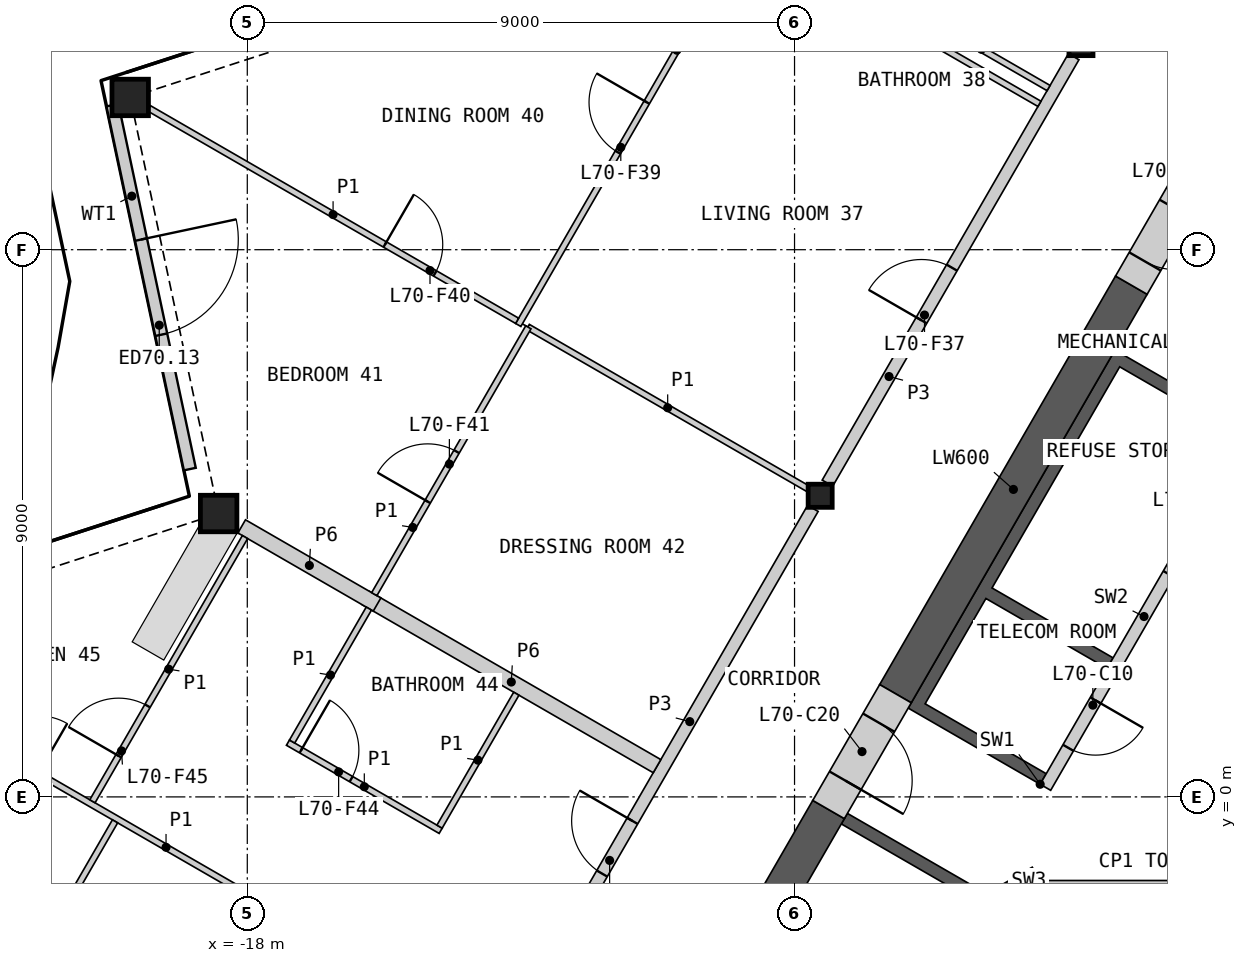
"""IFC4 building model, lengths in metres.
Left out: names, types, materials, properties, quantities, classifications, styles, units other than length and angle.
Written with IfcOpenShell. Run it as: python <this file> out.ifc"""

import sys

from ifc_helpers import new_model, si_unit, direction, frame, frame_2d, origin, origin_2d, place, context, subcontext, project, spatial, polyline, rectangle, hollow_rectangle, i_section, outline, extrude, element, fill, save


model = new_model("IFC4")
c1 = context("Model", 3, precision=1e-05, world=origin(), true_north=direction((0.0, 1.0)))
c2 = subcontext(c1, "Body", "Model", "MODEL_VIEW")
j1 = project(units=[si_unit("LENGTHUNIT", "METRE"), si_unit("PLANEANGLEUNIT", "RADIAN")], contexts=[c1])
p1 = place(None, origin())
s1 = spatial("IfcSite", under=j1, at=p1, CompositionType="ELEMENT")
p2 = place(p1, origin())
s2 = spatial("IfcBuilding", under=s1, at=p2, CompositionType="ELEMENT")
p3 = place(p2, frame((0.0, 0.0, 318.8)))
s3 = spatial("IfcBuildingStorey", under=s2, at=p3, CompositionType="ELEMENT", Elevation=318.8)
for number, where, z_axis, x_axis in (
    (1, (-19.926, 11.504, 0.0), (0.0, 0.0, 1.0), (1.0, 0.0, 0.0)),
    (2, (-18.471, 4.661, 0.0), (0.0, 0.0, 1.0), (1.0, 0.0, 0.0)),
):
    element("IfcColumn", number, at=place(p3, frame(where, z_axis=z_axis, x_axis=x_axis)), inside=s3, PredefinedType="COLUMN", context=c2, shape_type="SweptSolid", body=[
        extrude(hollow_rectangle(XDim=0.6, YDim=0.6, WallThickness=0.04, at=origin_2d()), origin(), (0.0, 0.0, 1.0), 3.4),
    ])
for number, where, z_axis, x_axis in (
    (3, (-4.289, 12.382, 0.0), (0.0, 0.0, 1.0), (1.0, 0.0, 0.0)),
    (4, (-8.578, 4.953, 0.0), (0.0, 0.0, 1.0), (1.0, 0.0, 0.0)),
):
    element("IfcColumn", number, at=place(p3, frame(where, z_axis=z_axis, x_axis=x_axis)), inside=s3, PredefinedType="COLUMN", context=c2, shape_type="SweptSolid", body=[
        extrude(i_section(OverallWidth=0.396, OverallDepth=0.381, WebThickness=0.019, FlangeThickness=0.03, at=origin_2d()), origin(), (0.0, 0.0, 1.0), 3.4),
    ])
p4 = place(p3, frame((-20.217, 11.377, 0.0), z_axis=(0.0, 0.0, 1.0), x_axis=(0.207885951908, -0.978153071354, 0.0)))
e5 = element("IfcWall", 5, at=p4, inside=s3, PredefinedType="SOLIDWALL", context=c2, shape_type="SweptSolid", body=[
    extrude(rectangle(XDim=6.12, YDim=0.2, at=frame_2d((3.06, 0.0))), origin(), (0.0, 0.0, 1.0), 2.488),
])
p5 = place(p4, frame((2.26, 0.0, 0.0)))
e6 = element("IfcOpeningElement", 6, at=p5, cuts=e5, PredefinedType="OPENING", context=c2, shape_type="SweptSolid", body=[
    extrude(rectangle(XDim=1.6, YDim=2.25, at=frame_2d((0.8, 1.125))), frame((0.0, 0.11, 0.0), z_axis=(0.0, -1.0, 0.0), x_axis=(1.0, 0.0, 0.0)), (0.0, 0.0, 1.0), 0.22),
])
p6 = place(p3, origin())
e7 = element("IfcWall", 7, at=p6, inside=s3, PredefinedType="SHEAR", context=c2, shape_type="SweptSolid", body=[
    extrude(outline(polyline([(-6.061, -1.697), (-8.231, -0.444), (-8.131, -0.271), (-5.96, -1.524), (-6.061, -1.697)])), origin(), (0.0, 0.0, 1.0), 3.1),
])
p7 = place(p3, origin())
e8 = element("IfcWall", 8, at=p7, inside=s3, PredefinedType="SHEAR", context=c2, shape_type="SweptSolid", body=[
    extrude(outline(polyline([(-4.96, 0.208), (-7.131, 1.461), (-3.731, 7.35), (-1.561, 6.097), (-1.66, 5.924), (-3.652, 7.074), (-5.752, 3.437), (-3.76, 2.287), (-3.861, 2.113), (-5.852, 3.263), (-6.852, 1.531), (-4.861, 0.381), (-4.96, 0.208)])), origin(), (0.0, 0.0, 1.0), 3.1),
])
p8 = place(p3, frame((-1.631, 5.776, 0.0), z_axis=(0.0, 0.0, 1.0), x_axis=(-0.499992876559, -0.866029516466, 0.0)))
e9 = element("IfcWall", 9, at=p8, inside=s3, PredefinedType="SOLIDWALL", context=c2, shape_type="SweptSolid", body=[
    extrude(rectangle(XDim=6.486, YDim=0.2, at=frame_2d((3.243, 0.0))), origin(), (0.0, 0.0, 1.0), 3.1),
])
p9 = place(p8, frame((1.537, 0.0, 0.0)))
e10 = element("IfcOpeningElement", 10, at=p9, cuts=e9, PredefinedType="OPENING", context=c2, shape_type="SweptSolid", body=[
    extrude(rectangle(XDim=0.9, YDim=2.1, at=frame_2d((0.45, 1.05))), frame((0.0, 0.11, 0.0), z_axis=(0.0, -1.0, 0.0), x_axis=(1.0, 0.0, 0.0)), (0.0, 0.0, 1.0), 0.22),
])
p10 = place(p8, frame((4.837, 0.0, 0.0)))
e11 = element("IfcOpeningElement", 11, at=p10, cuts=e9, PredefinedType="OPENING", context=c2, shape_type="SweptSolid", body=[
    extrude(rectangle(XDim=0.9, YDim=2.1, at=frame_2d((0.45, 1.05))), frame((0.0, 0.11, 0.0), z_axis=(0.0, -1.0, 0.0), x_axis=(1.0, 0.0, 0.0)), (0.0, 0.0, 1.0), 0.22),
])
p11 = place(p3, frame((-4.941, -1.45, 0.0), z_axis=(0.0, 0.0, 1.0), x_axis=(1.0, 0.0, 0.0)))
e12 = element("IfcWall", 12, at=p11, inside=s3, PredefinedType="PARTITIONING", context=c2, shape_type="SweptSolid", body=[
    extrude(rectangle(XDim=9.882, YDim=0.15, at=frame_2d((4.941, 0.0))), origin(), (0.0, 0.0, 1.0), 3.1),
])
p12 = place(p11, frame((4.391, 0.0, 0.0)))
e13 = element("IfcOpeningElement", 13, at=p12, cuts=e12, PredefinedType="OPENING", context=c2, shape_type="SweptSolid", body=[
    extrude(rectangle(XDim=1.1, YDim=2.1, at=frame_2d((0.55, 1.05))), frame((0.0, 0.085, 0.0), z_axis=(0.0, -1.0, 0.0), x_axis=(1.0, 0.0, 0.0)), (0.0, 0.0, 1.0), 0.17),
])
p13 = place(p3, origin())
e14 = element("IfcWall", 14, at=p13, inside=s3, PredefinedType="SHEAR", context=c2, shape_type="SweptSolid", body=[
    extrude(outline(polyline([(-5.307, -1.281), (-10.374, -4.206), (-10.032, -4.298), (-5.182, -1.498), (-5.307, -1.281)])), origin(), (0.0, 0.0, 1.0), 3.1),
])
p14 = place(p3, frame((-5.199, -1.219, 0.0), z_axis=(0.0, 0.0, 1.0), x_axis=(0.499982516597, -0.866035497597, 0.0)))
e15 = element("IfcWall", 15, at=p14, inside=s3, PredefinedType="SHEAR", context=c2, shape_type="SweptSolid", body=[
    extrude(rectangle(XDim=3.088, YDim=0.25, at=frame_2d((1.544, 0.0))), origin(), (0.0, 0.0, 1.0), 3.1),
])
p15 = place(p14, frame((0.994, 0.0, 0.0)))
e16 = element("IfcOpeningElement", 16, at=p15, cuts=e15, PredefinedType="OPENING", context=c2, shape_type="SweptSolid", body=[
    extrude(rectangle(XDim=1.1, YDim=2.1, at=frame_2d((0.55, 1.05))), frame((0.0, 0.135, 0.0), z_axis=(0.0, -1.0, 0.0), x_axis=(1.0, 0.0, 0.0)), (0.0, 0.0, 1.0), 0.27),
])
p16 = place(p3, frame((-3.461, 8.417, 0.0), z_axis=(0.0, 0.0, 1.0), x_axis=(-0.50000391502, -0.866023143435, 0.0)))
e17 = element("IfcWall", 17, at=p16, inside=s3, PredefinedType="SHEAR", context=c2, shape_type="SweptSolid", body=[
    extrude(rectangle(XDim=7.759, YDim=0.6, at=frame_2d((3.879, 0.0))), origin(), (0.0, 0.0, 1.0), 3.1),
])
p17 = place(p3, frame((-8.44, -0.208, 0.0), z_axis=(0.0, 0.0, 1.0), x_axis=(-0.500007425856, -0.866021116422, 0.0)))
e18 = element("IfcWall", 18, at=p17, inside=s3, PredefinedType="SHEAR", context=c2, shape_type="SweptSolid", body=[
    extrude(rectangle(XDim=4.969, YDim=0.6, at=frame_2d((2.484, 0.0))), origin(), (0.0, 0.0, 1.0), 3.1),
])
p18 = place(p3, frame((-2.361, 10.322, 0.0), z_axis=(0.0, 0.0, 1.0), x_axis=(-0.499946605688, -0.86605622881, 0.0)))
e19 = element("IfcWall", 19, at=p18, inside=s3, PredefinedType="SHEAR", context=c2, shape_type="SweptSolid", body=[
    extrude(rectangle(XDim=2.2, YDim=0.6, at=frame_2d((1.1, 0.0))), origin(), (0.0, 0.0, 1.0), 3.1),
])
p19 = place(p18, frame((0.75, 0.0, 0.0)))
e20 = element("IfcOpeningElement", 20, at=p19, cuts=e19, PredefinedType="OPENING", context=c2, shape_type="SweptSolid", body=[
    extrude(rectangle(XDim=1.0, YDim=2.1, at=frame_2d((0.5, 1.05))), frame((0.0, 0.31, 0.0), z_axis=(0.0, -1.0, 0.0), x_axis=(1.0, 0.0, 0.0)), (0.0, 0.0, 1.0), 0.62),
])
p20 = place(p3, frame((-7.34, 1.698, 0.0), z_axis=(0.0, 0.0, 1.0), x_axis=(-0.50002983664, -0.866008176907, 0.0)))
e21 = element("IfcWall", 21, at=p20, inside=s3, PredefinedType="SHEAR", context=c2, shape_type="SweptSolid", body=[
    extrude(rectangle(XDim=2.2, YDim=0.6, at=frame_2d((1.1, 0.0))), origin(), (0.0, 0.0, 1.0), 3.1),
])
p21 = place(p20, frame((0.55, 0.0, 0.0)))
e22 = element("IfcOpeningElement", 22, at=p21, cuts=e21, PredefinedType="OPENING", context=c2, shape_type="SweptSolid", body=[
    extrude(rectangle(XDim=1.1, YDim=2.1, at=frame_2d((0.55, 1.05))), frame((0.0, 0.31, 0.0), z_axis=(0.0, -1.0, 0.0), x_axis=(1.0, 0.0, 0.0)), (0.0, 0.0, 1.0), 0.62),
])
p22 = place(p3, frame((-8.458, 5.16, 0.0), z_axis=(0.0, 0.0, 1.0), x_axis=(0.499984266882, 0.866034487114, 0.0)))
e23 = element("IfcWall", 23, at=p22, inside=s3, PredefinedType="PARTITIONING", context=c2, shape_type="SweptSolid", body=[
    extrude(rectangle(XDim=8.099, YDim=0.2, at=frame_2d((4.049, 0.0))), origin(), (0.0, 0.0, 1.0), 3.1),
])
p23 = place(p22, frame((3.093, 0.0, 0.0)))
e24 = element("IfcOpeningElement", 24, at=p23, cuts=e23, PredefinedType="OPENING", context=c2, shape_type="SweptSolid", body=[
    extrude(rectangle(XDim=1.0, YDim=2.1, at=frame_2d((0.5, 1.05))), frame((0.0, 0.11, 0.0), z_axis=(0.0, -1.0, 0.0), x_axis=(1.0, 0.0, 0.0)), (0.0, 0.0, 1.0), 0.22),
])
p24 = place(p3, frame((-12.748, -2.269, 0.0), z_axis=(0.0, 0.0, 1.0), x_axis=(0.499984266882, 0.866034487114, 0.0)))
e25 = element("IfcWall", 25, at=p24, inside=s3, PredefinedType="PARTITIONING", context=c2, shape_type="SweptSolid", body=[
    extrude(rectangle(XDim=8.099, YDim=0.2, at=frame_2d((4.049, 0.0))), origin(), (0.0, 0.0, 1.0), 3.1),
])
p25 = place(p24, frame((1.164, 0.0, 0.0)))
e26 = element("IfcOpeningElement", 26, at=p25, cuts=e25, PredefinedType="OPENING", context=c2, shape_type="SweptSolid", body=[
    extrude(rectangle(XDim=1.0, YDim=2.1, at=frame_2d((0.5, 1.05))), frame((0.0, 0.11, 0.0), z_axis=(0.0, -1.0, 0.0), x_axis=(1.0, 0.0, 0.0)), (0.0, 0.0, 1.0), 0.22),
])
p26 = place(p3, frame((-16.055, 3.273, 0.0), z_axis=(0.0, 0.0, 1.0), x_axis=(0.866019581949, -0.500010083578, 0.0)))
e27 = element("IfcWall", 27, at=p26, inside=s3, PredefinedType="PARTITIONING", context=c2, shape_type="SweptSolid", body=[
    extrude(rectangle(XDim=5.535, YDim=0.25, at=frame_2d((2.768, 0.0))), origin(), (0.0, 0.0, 1.0), 2.33),
])
p27 = place(p3, frame((-18.092, 4.449, 0.0), z_axis=(0.0, 0.0, 1.0), x_axis=(0.866043267704, -0.499969057507, 0.0)))
e28 = element("IfcWall", 28, at=p27, inside=s3, PredefinedType="PARTITIONING", context=c2, shape_type="SweptSolid", body=[
    extrude(rectangle(XDim=2.571, YDim=0.25, at=frame_2d((1.286, 0.0))), origin(), (0.0, 0.0, 1.0), 2.33),
])
p28 = place(p3, frame((-24.815, 2.334, 0.0), z_axis=(0.0, 0.0, 1.0), x_axis=(0.866024591023, -0.500001407741, 0.0)))
e29 = element("IfcWall", 29, at=p28, inside=s3, PredefinedType="PARTITIONING", context=c2, shape_type="SweptSolid", body=[
    extrude(rectangle(XDim=12.652, YDim=0.1, at=frame_2d((6.326, 0.0))), origin(), (0.0, 0.0, 1.0), 2.33),
])
p29 = place(p28, frame((2.95, 0.0, 0.0)))
e30 = element("IfcOpeningElement", 30, at=p29, cuts=e29, PredefinedType="OPENING", context=c2, shape_type="SweptSolid", body=[
    extrude(rectangle(XDim=0.95, YDim=2.1, at=frame_2d((0.475, 1.05))), frame((0.0, 0.06, 0.0), z_axis=(0.0, -1.0, 0.0), x_axis=(1.0, 0.0, 0.0)), (0.0, 0.0, 1.0), 0.12),
])
p30 = place(p3, frame((-13.544, 7.762, 0.0), z_axis=(0.0, 0.0, 1.0), x_axis=(0.499993819111, 0.866028972293, 0.0)))
e31 = element("IfcWall", 31, at=p30, inside=s3, PredefinedType="PARTITIONING", context=c2, shape_type="SweptSolid", body=[
    extrude(rectangle(XDim=10.436, YDim=0.1, at=frame_2d((5.218, 0.0))), origin(), (0.0, 0.0, 1.0), 2.33),
])
p31 = place(p30, frame((3.279, 0.0, 0.0)))
e32 = element("IfcOpeningElement", 32, at=p31, cuts=e31, PredefinedType="OPENING", context=c2, shape_type="SweptSolid", body=[
    extrude(rectangle(XDim=0.95, YDim=2.1, at=frame_2d((0.475, 1.05))), frame((0.0, 0.06, 0.0), z_axis=(0.0, -1.0, 0.0), x_axis=(1.0, 0.0, 0.0)), (0.0, 0.0, 1.0), 0.12),
])
p32 = place(p3, frame((-19.615, 11.325, 0.0), z_axis=(0.0, 0.0, 1.0), x_axis=(0.866013987544, -0.500019772988, 0.0)))
e33 = element("IfcWall", 33, at=p32, inside=s3, PredefinedType="PARTITIONING", context=c2, shape_type="SweptSolid", body=[
    extrude(rectangle(XDim=6.99, YDim=0.1, at=frame_2d((3.495, 0.0))), origin(), (0.0, 0.0, 1.0), 2.33),
])
p33 = place(p32, frame((4.48, 0.0, 0.0)))
e34 = element("IfcOpeningElement", 34, at=p33, cuts=e33, PredefinedType="OPENING", context=c2, shape_type="SweptSolid", body=[
    extrude(rectangle(XDim=0.95, YDim=2.1, at=frame_2d((0.475, 1.05))), frame((0.0, 0.06, 0.0), z_axis=(0.0, -1.0, 0.0), x_axis=(1.0, 0.0, 0.0)), (0.0, 0.0, 1.0), 0.12),
])
p34 = place(p3, frame((-23.536, -6.224, 0.0), z_axis=(0.0, 0.0, 1.0), x_axis=(0.500002256251, 0.866024101133, 0.0)))
e35 = element("IfcWall", 35, at=p34, inside=s3, PredefinedType="PARTITIONING", context=c2, shape_type="SweptSolid", body=[
    extrude(rectangle(XDim=6.722, YDim=0.1, at=frame_2d((3.361, 0.0))), origin(), (0.0, 0.0, 1.0), 2.33),
])
p35 = place(p34, frame((3.292, 0.0, 0.0)))
e36 = element("IfcOpeningElement", 36, at=p35, cuts=e35, PredefinedType="OPENING", context=c2, shape_type="SweptSolid", body=[
    extrude(rectangle(XDim=0.95, YDim=2.1, at=frame_2d((0.475, 1.05))), frame((0.0, 0.06, 0.0), z_axis=(0.0, -1.0, 0.0), x_axis=(1.0, 0.0, 0.0)), (0.0, 0.0, 1.0), 0.12),
])
p36 = place(p3, frame((-9.783, 14.177, 0.0), z_axis=(0.0, 0.0, 1.0), x_axis=(0.866030435321, -0.499991285022, 0.0)))
e37 = element("IfcWall", 37, at=p36, inside=s3, PredefinedType="PARTITIONING", context=c2, shape_type="SweptSolid", body=[
    extrude(rectangle(XDim=5.555, YDim=0.1, at=frame_2d((2.778, 0.0))), origin(), (0.0, 0.0, 1.0), 2.33),
])
p37 = place(p36, frame((1.852, 0.0, 0.0)))
e38 = element("IfcOpeningElement", 38, at=p37, cuts=e37, PredefinedType="OPENING", context=c2, shape_type="SweptSolid", body=[
    extrude(rectangle(XDim=0.95, YDim=2.1, at=frame_2d((0.475, 1.05))), frame((0.0, 0.06, 0.0), z_axis=(0.0, -1.0, 0.0), x_axis=(1.0, 0.0, 0.0)), (0.0, 0.0, 1.0), 0.12),
])
p38 = place(p3, frame((-13.386, 7.729, 0.0), z_axis=(0.0, 0.0, 1.0), x_axis=(0.866034036823, -0.49998504684, 0.0)))
e39 = element("IfcWall", 39, at=p38, inside=s3, PredefinedType="PARTITIONING", context=c2, shape_type="SweptSolid", body=[
    extrude(rectangle(XDim=5.312, YDim=0.1, at=frame_2d((2.656, 0.0))), origin(), (0.0, 0.0, 1.0), 2.33),
])
p39 = place(p3, frame((-15.912, 3.335, 0.0), z_axis=(0.0, 0.0, 1.0), x_axis=(0.49999906822, 0.866025941747, 0.0)))
e40 = element("IfcWall", 40, at=p39, inside=s3, PredefinedType="PARTITIONING", context=c2, shape_type="SweptSolid", body=[
    extrude(rectangle(XDim=5.068, YDim=0.1, at=frame_2d((2.534, 0.0))), origin(), (0.0, 0.0, 1.0), 2.33),
])
p40 = place(p39, frame((1.757, 0.0, 0.0)))
e41 = element("IfcOpeningElement", 41, at=p40, cuts=e40, PredefinedType="OPENING", context=c2, shape_type="SweptSolid", body=[
    extrude(rectangle(XDim=0.95, YDim=2.1, at=frame_2d((0.475, 1.05))), frame((0.0, 0.06, 0.0), z_axis=(0.0, -1.0, 0.0), x_axis=(1.0, 0.0, 0.0)), (0.0, 0.0, 1.0), 0.12),
])
p41 = place(p3, frame((-20.547, -0.072, 0.0), z_axis=(0.0, 0.0, 1.0), x_axis=(0.499969537666, 0.866042990507, 0.0)))
e42 = element("IfcWall", 42, at=p41, inside=s3, PredefinedType="PARTITIONING", context=c2, shape_type="SweptSolid", body=[
    extrude(rectangle(XDim=5.018, YDim=0.1, at=frame_2d((2.509, 0.0))), origin(), (0.0, 0.0, 1.0), 2.33),
])
p42 = place(p41, frame((0.862, 0.0, 0.0)))
e43 = element("IfcOpeningElement", 43, at=p42, cuts=e42, PredefinedType="OPENING", context=c2, shape_type="SweptSolid", body=[
    extrude(rectangle(XDim=0.95, YDim=2.1, at=frame_2d((0.475, 1.05))), frame((0.0, 0.06, 0.0), z_axis=(0.0, -1.0, 0.0), x_axis=(1.0, 0.0, 0.0)), (0.0, 0.0, 1.0), 0.12),
])
p43 = place(p3, frame((-17.331, 0.892, 0.0), z_axis=(0.0, 0.0, 1.0), x_axis=(0.866032775405, -0.499987231761, 0.0)))
e44 = element("IfcWall", 44, at=p43, inside=s3, PredefinedType="PARTITIONING", context=c2, shape_type="SweptSolid", body=[
    extrude(rectangle(XDim=2.9, YDim=0.1, at=frame_2d((1.45, 0.0))), origin(), (0.0, 0.0, 1.0), 2.33),
])
p44 = place(p43, frame((0.25, 0.0, 0.0)))
e45 = element("IfcOpeningElement", 45, at=p44, cuts=e44, PredefinedType="OPENING", context=c2, shape_type="SweptSolid", body=[
    extrude(rectangle(XDim=0.95, YDim=2.1, at=frame_2d((0.475, 1.05))), frame((0.0, 0.06, 0.0), z_axis=(0.0, -1.0, 0.0), x_axis=(1.0, 0.0, 0.0)), (0.0, 0.0, 1.0), 0.12),
])
for number, where, z_axis, x_axis in (
    (46, (-14.838, -0.489, 0.0), (0.0, 0.0, 1.0), (0.5, 0.866, 0.0)),
    (47, (-17.263, 0.911, 0.0), (0.0, 0.0, 1.0), (0.5, 0.866, 0.0)),
):
    element("IfcWall", number, at=place(p3, frame(where, z_axis=z_axis, x_axis=x_axis)), inside=s3, PredefinedType="PARTITIONING", context=c2, shape_type="SweptSolid", body=[
        extrude(rectangle(XDim=2.525, YDim=0.1, at=frame_2d((1.262, 0.0))), origin(), (0.0, 0.0, 1.0), 2.33),
    ])
p45 = place(p3, frame((-7.031, 12.934, 0.0), z_axis=(0.0, 0.0, 1.0), x_axis=(0.866030925526, -0.499990435942, 0.0)))
e48 = element("IfcWall", 48, at=p45, inside=s3, PredefinedType="PARTITIONING", context=c2, shape_type="SweptSolid", body=[
    extrude(rectangle(XDim=2.55, YDim=0.1, at=frame_2d((1.275, 0.0))), origin(), (0.0, 0.0, 1.0), 2.33),
])
p46 = place(p5, origin())
e49 = element("IfcDoor", 49, at=p46, inside=s3, OperationType="DOUBLE_DOOR_SINGLE_SWING", PredefinedType="DOOR", context=c2, shape_type="SweptSolid", body=[
    extrude(rectangle(XDim=1.6, YDim=2.25, at=frame_2d((0.8, 1.125))), frame((0.0, 0.025, 0.0), z_axis=(0.0, -1.0, 0.0), x_axis=(1.0, 0.0, 0.0)), (0.0, 0.0, 1.0), 0.05),
])
fill(e6, e49)
p47 = place(p9, origin())
e50 = element("IfcDoor", 50, at=p47, inside=s3, OperationType="SINGLE_SWING_LEFT", PredefinedType="DOOR", context=c2, shape_type="SweptSolid", body=[
    extrude(rectangle(XDim=0.9, YDim=2.1, at=frame_2d((0.45, 1.05))), frame((0.0, 0.025, 0.0), z_axis=(0.0, -1.0, 0.0), x_axis=(1.0, 0.0, 0.0)), (0.0, 0.0, 1.0), 0.05),
])
fill(e10, e50)
p48 = place(p10, origin())
e51 = element("IfcDoor", 51, at=p48, inside=s3, OperationType="SINGLE_SWING_LEFT", PredefinedType="DOOR", context=c2, shape_type="SweptSolid", body=[
    extrude(rectangle(XDim=0.9, YDim=2.1, at=frame_2d((0.45, 1.05))), frame((0.0, 0.025, 0.0), z_axis=(0.0, -1.0, 0.0), x_axis=(1.0, 0.0, 0.0)), (0.0, 0.0, 1.0), 0.05),
])
fill(e11, e51)
p49 = place(p19, origin())
e52 = element("IfcDoor", 52, at=p49, inside=s3, OperationType="SINGLE_SWING_LEFT", PredefinedType="DOOR", context=c2, shape_type="SweptSolid", body=[
    extrude(rectangle(XDim=1.0, YDim=2.1, at=frame_2d((0.5, 1.05))), frame((0.0, 0.055, 0.0), z_axis=(0.0, -1.0, 0.0), x_axis=(1.0, 0.0, 0.0)), (0.0, 0.0, 1.0), 0.05),
])
fill(e20, e52)
p50 = place(p21, origin())
e53 = element("IfcDoor", 53, at=p50, inside=s3, OperationType="SINGLE_SWING_RIGHT", PredefinedType="DOOR", context=c2, shape_type="SweptSolid", body=[
    extrude(rectangle(XDim=1.1, YDim=2.1, at=frame_2d((0.55, 1.05))), frame((0.0, 0.055, 0.0), z_axis=(0.0, -1.0, 0.0), x_axis=(1.0, 0.0, 0.0)), (0.0, 0.0, 1.0), 0.05),
])
fill(e22, e53)
p51 = place(p23, origin())
e54 = element("IfcDoor", 54, at=p51, inside=s3, OperationType="SINGLE_SWING_LEFT", PredefinedType="DOOR", context=c2, shape_type="SweptSolid", body=[
    extrude(rectangle(XDim=1.0, YDim=2.1, at=frame_2d((0.5, 1.05))), frame((0.0, 0.025, 0.0), z_axis=(0.0, -1.0, 0.0), x_axis=(1.0, 0.0, 0.0)), (0.0, 0.0, 1.0), 0.05),
])
fill(e24, e54)
p52 = place(p31, origin())
e55 = element("IfcDoor", 55, at=p52, inside=s3, OperationType="SINGLE_SWING_RIGHT", PredefinedType="DOOR", context=c2, shape_type="SweptSolid", body=[
    extrude(rectangle(XDim=0.95, YDim=2.1, at=frame_2d((0.475, 1.05))), frame((0.0, 0.025, 0.0), z_axis=(0.0, -1.0, 0.0), x_axis=(1.0, 0.0, 0.0)), (0.0, 0.0, 1.0), 0.05),
])
fill(e32, e55)
p53 = place(p33, origin())
e56 = element("IfcDoor", 56, at=p53, inside=s3, OperationType="SINGLE_SWING_LEFT", PredefinedType="DOOR", context=c2, shape_type="SweptSolid", body=[
    extrude(rectangle(XDim=0.95, YDim=2.1, at=frame_2d((0.475, 1.05))), frame((0.0, 0.025, 0.0), z_axis=(0.0, -1.0, 0.0), x_axis=(1.0, 0.0, 0.0)), (0.0, 0.0, 1.0), 0.05),
])
fill(e34, e56)
p54 = place(p40, origin())
e57 = element("IfcDoor", 57, at=p54, inside=s3, OperationType="SINGLE_SWING_LEFT", PredefinedType="DOOR", context=c2, shape_type="SweptSolid", body=[
    extrude(rectangle(XDim=0.95, YDim=2.1, at=frame_2d((0.475, 1.05))), frame((0.0, 0.025, 0.0), z_axis=(0.0, -1.0, 0.0), x_axis=(1.0, 0.0, 0.0)), (0.0, 0.0, 1.0), 0.05),
])
fill(e41, e57)
p55 = place(p25, origin())
e58 = element("IfcDoor", 58, at=p55, inside=s3, OperationType="SINGLE_SWING_RIGHT", PredefinedType="DOOR", context=c2, shape_type="SweptSolid", body=[
    extrude(rectangle(XDim=1.0, YDim=2.1, at=frame_2d((0.5, 1.05))), frame((0.0, 0.025, 0.0), z_axis=(0.0, -1.0, 0.0), x_axis=(1.0, 0.0, 0.0)), (0.0, 0.0, 1.0), 0.05),
])
fill(e26, e58)
p56 = place(p44, origin())
e59 = element("IfcDoor", 59, at=p56, inside=s3, OperationType="SINGLE_SWING_LEFT", PredefinedType="DOOR", context=c2, shape_type="SweptSolid", body=[
    extrude(rectangle(XDim=0.95, YDim=2.1, at=frame_2d((0.475, 1.05))), frame((0.0, 0.025, 0.0), z_axis=(0.0, -1.0, 0.0), x_axis=(1.0, 0.0, 0.0)), (0.0, 0.0, 1.0), 0.05),
])
fill(e45, e59)
p57 = place(p42, origin())
e60 = element("IfcDoor", 60, at=p57, inside=s3, OperationType="SINGLE_SWING_LEFT", PredefinedType="DOOR", context=c2, shape_type="SweptSolid", body=[
    extrude(rectangle(XDim=0.95, YDim=2.1, at=frame_2d((0.475, 1.05))), frame((0.0, 0.025, 0.0), z_axis=(0.0, -1.0, 0.0), x_axis=(1.0, 0.0, 0.0)), (0.0, 0.0, 1.0), 0.05),
])
fill(e43, e60)
save(model, sys.argv[1])
